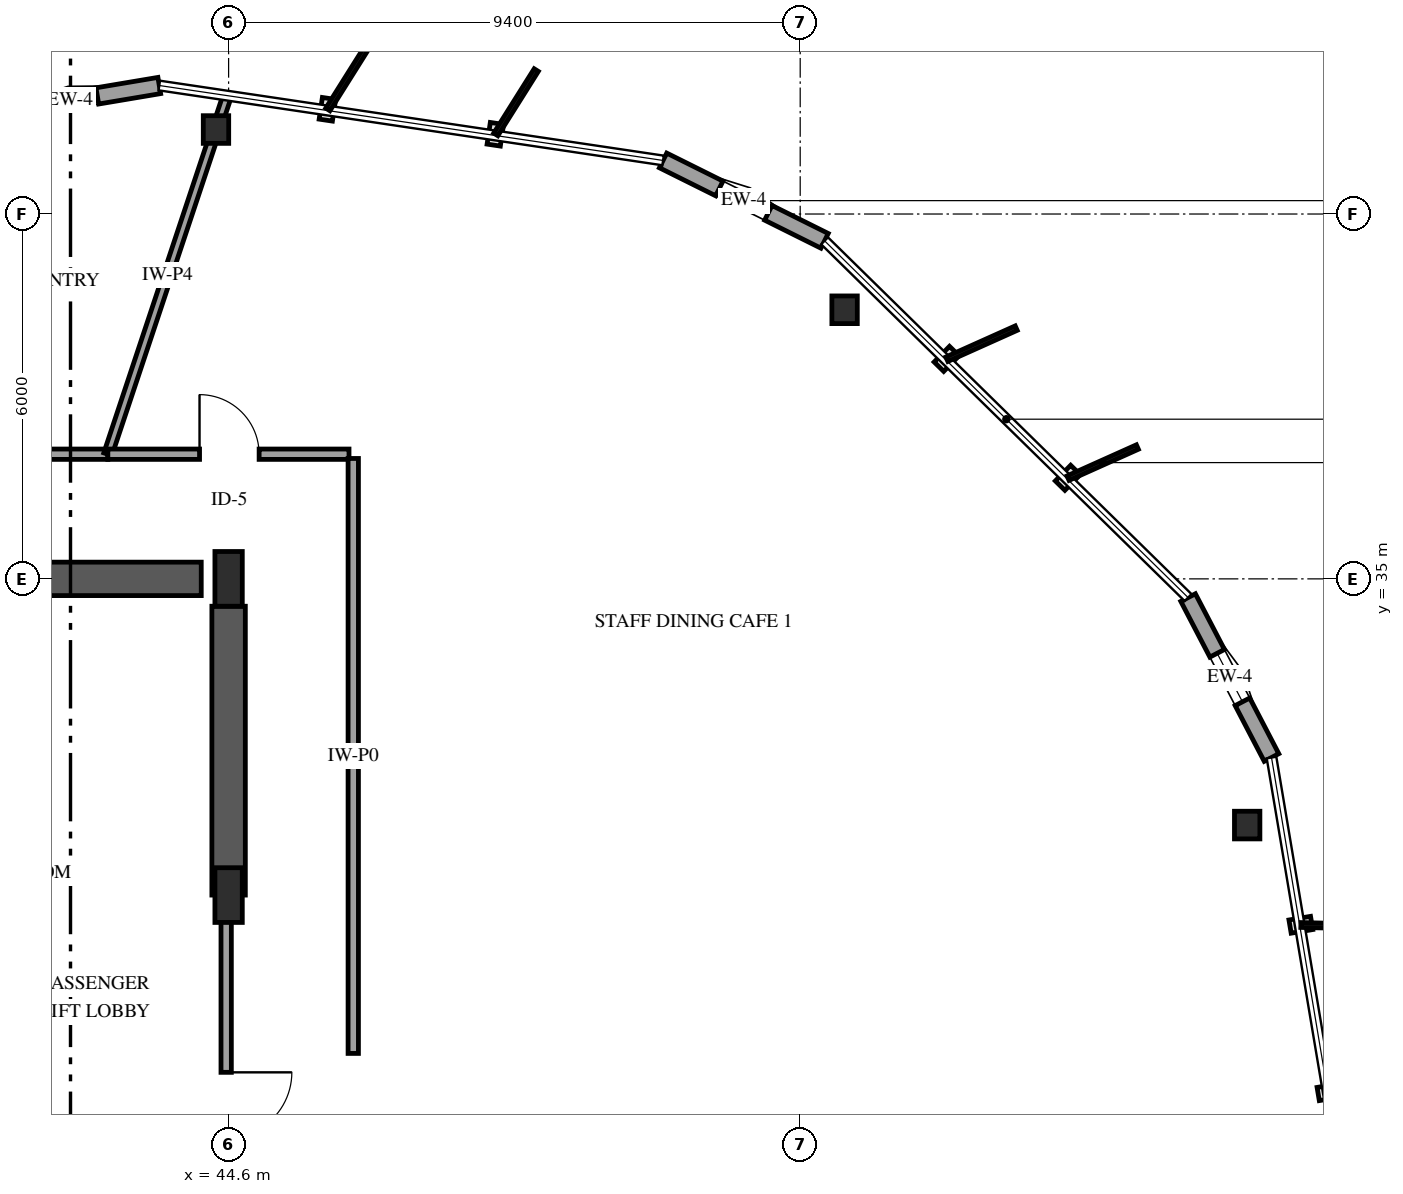
"""IFC4 building model, lengths in metres.
Left out: names, types, materials, properties, quantities, classifications, styles, units other than length and angle.
Written with IfcOpenShell. Run it as: python <this file> out.ifc"""

import sys

from ifc_helpers import new_model, si_unit, direction, frame, frame_2d, origin, origin_2d, place, context, subcontext, project, spatial, rectangle, i_section, extrude, element, fill, save


model = new_model("IFC4")
c1 = context("Model", 3, precision=1e-05, world=origin(), true_north=direction((0.0, 1.0)))
c2 = subcontext(c1, "Body", "Model", "MODEL_VIEW")
j1 = project(units=[si_unit("LENGTHUNIT", "METRE"), si_unit("PLANEANGLEUNIT", "RADIAN")], contexts=[c1])
p1 = place(None, origin())
s1 = spatial("IfcSite", under=j1, at=p1, CompositionType="ELEMENT")
p2 = place(p1, origin())
s2 = spatial("IfcBuilding", under=s1, at=p2, CompositionType="ELEMENT")
p3 = place(p2, frame((0.0, 0.0, 134.2)))
s3 = spatial("IfcBuildingStorey", under=s2, at=p3, CompositionType="ELEMENT", Elevation=134.2)
p4 = place(p3, frame((41.3, 35.0, 0.0), z_axis=(0.0, 0.0, 1.0), x_axis=(1.0, 0.0, 0.0)))
e1 = element("IfcWall", 1, at=p4, inside=s3, PredefinedType="SHEAR", context=c2, shape_type="SweptSolid", body=[
    extrude(rectangle(XDim=2.85, YDim=0.55, at=frame_2d((1.425, 0.0))), origin(), (0.0, 0.0, 1.0), 4.8),
])
p5 = place(p3, frame((44.6, 29.8, 0.0), z_axis=(0.0, 0.0, 1.0), x_axis=(0.0, 1.0, 0.0)))
e2 = element("IfcWall", 2, at=p5, inside=s3, PredefinedType="SHEAR", context=c2, shape_type="SweptSolid", body=[
    extrude(rectangle(XDim=4.75, YDim=0.55, at=frame_2d((2.375, 0.0))), origin(), (0.0, 0.0, 1.0), 4.8),
])
for number, where, z_axis, x_axis in (
    (3, (44.6, 29.8, 0.0), (0.0, 0.0, 1.0), (1.0, 0.0, 0.0)),
    (4, (44.6, 35.0, 0.0), (0.0, 0.0, 1.0), (1.0, 0.0, 0.0)),
):
    element("IfcColumn", number, at=place(p3, frame(where, z_axis=z_axis, x_axis=x_axis)), inside=s3, PredefinedType="PILASTER", context=c2, shape_type="SweptSolid", body=[
        extrude(rectangle(XDim=0.45, YDim=0.9, at=origin_2d()), origin(), (0.0, 0.0, 1.0), 4.5),
    ])
for number, where, z_axis, x_axis in (
    (5, (61.351, 30.951, 0.0), (0.0, 0.0, 1.0), (1.0, 0.0, 0.0)),
    (6, (54.73, 39.425, 0.0), (0.0, 0.0, 1.0), (1.0, 0.0, 0.0)),
    (7, (44.393, 42.389, 0.0), (0.0, 0.0, 1.0), (1.0, 0.0, 0.0)),
):
    element("IfcColumn", number, at=place(p3, frame(where, z_axis=z_axis, x_axis=x_axis)), inside=s3, PredefinedType="COLUMN", context=c2, shape_type="SweptSolid", body=[
        extrude(i_section(OverallWidth=0.418, OverallDepth=0.455, WebThickness=0.042, FlangeThickness=0.068, FilletRadius=0.038, at=origin_2d()), origin(), (0.0, 0.0, 1.0), 4.5),
    ])
p6 = place(p3, frame((54.401, 40.559, 0.0), z_axis=(0.0, 0.0, 1.0), x_axis=(-0.895215836877, 0.445632814551, 0.0)))
e8 = element("IfcWall", 8, at=p6, inside=s3, PredefinedType="SOLIDWALL", context=c2, shape_type="SweptSolid", body=[
    extrude(rectangle(XDim=2.967, YDim=0.27, at=frame_2d((1.483, 0.0))), origin(), (0.0, 0.0, 1.0), 3.879),
])
p7 = place(p6, frame((1.033, 0.0, 0.75)))
e9 = element("IfcOpeningElement", 9, at=p7, cuts=e8, PredefinedType="OPENING", context=c2, shape_type="SweptSolid", body=[
    extrude(rectangle(XDim=0.9, YDim=1.5, at=frame_2d((0.45, 0.75))), frame((0.0, 0.145, 0.0), z_axis=(0.0, -1.0, 0.0), x_axis=(1.0, 0.0, 0.0)), (0.0, 0.0, 1.0), 0.29),
])
p8 = place(p3, frame((43.46, 43.113, 0.0), z_axis=(0.0, 0.0, 1.0), x_axis=(-0.986168353547, -0.165746729871, 0.0)))
e10 = element("IfcWall", 10, at=p8, inside=s3, PredefinedType="SOLIDWALL", context=c2, shape_type="SweptSolid", body=[
    extrude(rectangle(XDim=2.967, YDim=0.27, at=frame_2d((1.483, 0.0))), origin(), (0.0, 0.0, 1.0), 3.879),
])
p9 = place(p8, frame((1.033, 0.0, 0.75)))
e11 = element("IfcOpeningElement", 11, at=p9, cuts=e10, PredefinedType="OPENING", context=c2, shape_type="SweptSolid", body=[
    extrude(rectangle(XDim=0.9, YDim=1.5, at=frame_2d((0.45, 0.75))), frame((0.0, 0.145, 0.0), z_axis=(0.0, -1.0, 0.0), x_axis=(1.0, 0.0, 0.0)), (0.0, 0.0, 1.0), 0.29),
])
p10 = place(p3, frame((61.751, 32.062, 0.0), z_axis=(0.0, 0.0, 1.0), x_axis=(-0.462422563067, 0.886659671558, 0.0)))
e12 = element("IfcWall", 12, at=p10, inside=s3, PredefinedType="SOLIDWALL", context=c2, shape_type="SweptSolid", body=[
    extrude(rectangle(XDim=2.967, YDim=0.27, at=frame_2d((1.483, 0.0))), origin(), (0.0, 0.0, 1.0), 3.879),
])
p11 = place(p10, frame((1.033, 0.0, 0.75)))
e13 = element("IfcOpeningElement", 13, at=p11, cuts=e12, PredefinedType="OPENING", context=c2, shape_type="SweptSolid", body=[
    extrude(rectangle(XDim=0.9, YDim=1.5, at=frame_2d((0.45, 0.75))), frame((0.0, 0.145, 0.0), z_axis=(0.0, -1.0, 0.0), x_axis=(1.0, 0.0, 0.0)), (0.0, 0.0, 1.0), 0.29),
])
p12 = place(p3, frame((34.81, 37.05, 0.0), z_axis=(0.0, 0.0, 1.0), x_axis=(1.0, 0.0, 0.0)))
e14 = element("IfcWall", 14, at=p12, inside=s3, PredefinedType="PARTITIONING", context=c2, shape_type="SweptSolid", body=[
    extrude(rectangle(XDim=7.804, YDim=0.17, at=frame_2d((3.902, 0.0))), origin(), (0.0, 0.0, 1.0), 4.5),
])
p13 = place(p12, frame((3.427, 0.0, 0.0)))
e15 = element("IfcOpeningElement", 15, at=p13, cuts=e14, PredefinedType="OPENING", context=c2, shape_type="SweptSolid", body=[
    extrude(rectangle(XDim=0.98, YDim=2.15, at=frame_2d((0.49, 1.075))), frame((0.0, 0.095, 0.0), z_axis=(0.0, -1.0, 0.0), x_axis=(1.0, 0.0, 0.0)), (0.0, 0.0, 1.0), 0.19),
])
p14 = place(p3, frame((44.56, 29.8, 0.0), z_axis=(0.0, 0.0, 1.0), x_axis=(0.0, -1.0, 0.0)))
e16 = element("IfcWall", 16, at=p14, inside=s3, PredefinedType="PARTITIONING", context=c2, shape_type="SweptSolid", body=[
    extrude(rectangle(XDim=6.91, YDim=0.17, at=frame_2d((3.455, 0.0))), origin(), (0.0, 0.0, 1.0), 3.54),
])
p15 = place(p14, frame((2.915, 0.0, 0.0)))
e17 = element("IfcOpeningElement", 17, at=p15, cuts=e16, PredefinedType="OPENING", context=c2, shape_type="SweptSolid", body=[
    extrude(rectangle(XDim=1.08, YDim=2.15, at=frame_2d((0.54, 1.075))), frame((0.0, 0.095, 0.0), z_axis=(0.0, -1.0, 0.0), x_axis=(1.0, 0.0, 0.0)), (0.0, 0.0, 1.0), 0.19),
])
p16 = place(p3, frame((42.614, 37.05, 0.0), z_axis=(0.0, 0.0, 1.0), x_axis=(0.315968506057, 0.948769678679, 0.0)))
e18 = element("IfcWall", 18, at=p16, inside=s3, PredefinedType="PARTITIONING", context=c2, shape_type="SweptSolid", body=[
    extrude(rectangle(XDim=6.215, YDim=0.14, at=frame_2d((3.108, 0.0))), origin(), (0.0, 0.0, 1.0), 2.79),
])
p17 = place(p3, frame((42.614, 37.05, 0.0), z_axis=(0.0, 0.0, 1.0), x_axis=(1.0, 0.0, 0.0)))
e19 = element("IfcWall", 19, at=p17, inside=s3, PredefinedType="PARTITIONING", context=c2, shape_type="SweptSolid", body=[
    extrude(rectangle(XDim=3.966, YDim=0.17, at=frame_2d((1.983, 0.0))), origin(), (0.0, 0.0, 1.0), 4.5),
])
p18 = place(p17, frame((1.508, 0.0, 0.0)))
e20 = element("IfcOpeningElement", 20, at=p18, cuts=e19, PredefinedType="OPENING", context=c2, shape_type="SweptSolid", body=[
    extrude(rectangle(XDim=0.98, YDim=2.15, at=frame_2d((0.49, 1.075))), frame((0.0, 0.095, 0.0), z_axis=(0.0, -1.0, 0.0), x_axis=(1.0, 0.0, 0.0)), (0.0, 0.0, 1.0), 0.19),
])
p19 = place(p3, frame((46.65, 36.98, 0.0), z_axis=(0.0, 0.0, 1.0), x_axis=(0.0, -1.0, 0.0)))
e21 = element("IfcWall", 21, at=p19, inside=s3, PredefinedType="PARTITIONING", context=c2, shape_type="SweptSolid", body=[
    extrude(rectangle(XDim=9.784, YDim=0.17, at=frame_2d((4.892, 0.0))), origin(), (0.0, 0.0, 1.0), 4.5),
])
p20 = place(p7, origin())
e22 = element("IfcWindow", 22, at=p20, inside=s3, PartitioningType="SINGLE_PANEL", PredefinedType="WINDOW", context=c2, shape_type="SweptSolid", body=[
    extrude(rectangle(XDim=0.9, YDim=1.5, at=frame_2d((0.45, 0.75))), frame((0.0, 0.03, 0.0), z_axis=(0.0, -1.0, 0.0), x_axis=(1.0, 0.0, 0.0)), (0.0, 0.0, 1.0), 0.06),
])
fill(e9, e22)
p21 = place(p9, origin())
e23 = element("IfcWindow", 23, at=p21, inside=s3, PartitioningType="SINGLE_PANEL", PredefinedType="WINDOW", context=c2, shape_type="SweptSolid", body=[
    extrude(rectangle(XDim=0.9, YDim=1.5, at=frame_2d((0.45, 0.75))), frame((0.0, 0.03, 0.0), z_axis=(0.0, -1.0, 0.0), x_axis=(1.0, 0.0, 0.0)), (0.0, 0.0, 1.0), 0.06),
])
fill(e11, e23)
p22 = place(p11, origin())
e24 = element("IfcWindow", 24, at=p22, inside=s3, PartitioningType="SINGLE_PANEL", PredefinedType="WINDOW", context=c2, shape_type="SweptSolid", body=[
    extrude(rectangle(XDim=0.9, YDim=1.5, at=frame_2d((0.45, 0.75))), frame((0.0, 0.03, 0.0), z_axis=(0.0, -1.0, 0.0), x_axis=(1.0, 0.0, 0.0)), (0.0, 0.0, 1.0), 0.06),
])
fill(e13, e24)
p23 = place(p15, origin())
e25 = element("IfcDoor", 25, at=p23, inside=s3, OperationType="SINGLE_SWING_LEFT", PredefinedType="DOOR", context=c2, shape_type="SweptSolid", body=[
    extrude(rectangle(XDim=1.08, YDim=2.15, at=frame_2d((0.54, 1.075))), frame((0.0, 0.025, 0.0), z_axis=(0.0, -1.0, 0.0), x_axis=(1.0, 0.0, 0.0)), (0.0, 0.0, 1.0), 0.05),
])
fill(e17, e25)
p24 = place(p18, origin())
e26 = element("IfcDoor", 26, at=p24, inside=s3, OperationType="SINGLE_SWING_LEFT", PredefinedType="DOOR", context=c2, shape_type="SweptSolid", body=[
    extrude(rectangle(XDim=0.98, YDim=2.15, at=frame_2d((0.49, 1.075))), frame((0.0, 0.025, 0.0), z_axis=(0.0, -1.0, 0.0), x_axis=(1.0, 0.0, 0.0)), (0.0, 0.0, 1.0), 0.05),
])
fill(e20, e26)
save(model, sys.argv[1])
